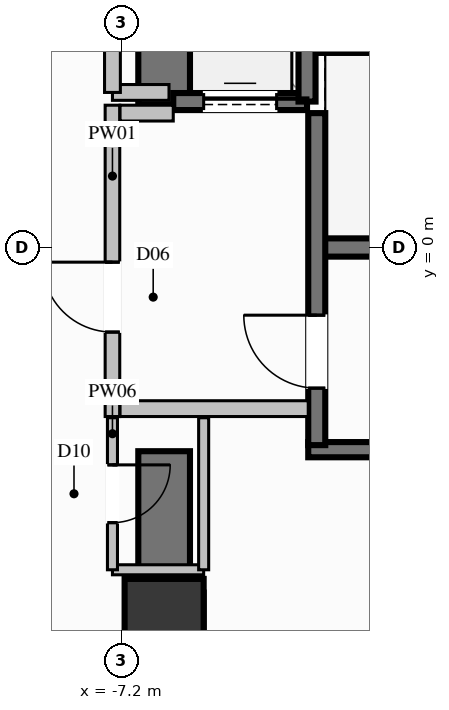
"""IFC4 building model, lengths in metres.
Left out: names, types, materials, properties, quantities, classifications, styles, units other than length and angle.
Written with IfcOpenShell. Run it as: python <this file> out.ifc"""

import sys

from ifc_helpers import new_model, si_unit, direction, frame, frame_2d, origin, origin_2d, place, context, subcontext, project, spatial, rectangle, extrude, element, fill, save


model = new_model("IFC4")
c1 = context("Model", 3, precision=1e-05, world=origin(), true_north=direction((0.0, 1.0)))
c2 = subcontext(c1, "Body", "Model", "MODEL_VIEW")
j1 = project(units=[si_unit("LENGTHUNIT", "METRE"), si_unit("PLANEANGLEUNIT", "RADIAN")], contexts=[c1])
p1 = place(None, origin())
s1 = spatial("IfcSite", under=j1, at=p1, CompositionType="ELEMENT")
p2 = place(p1, origin())
s2 = spatial("IfcBuilding", under=s1, at=p2, CompositionType="ELEMENT")
p3 = place(p2, frame((0.0, 0.0, -4.8)))
s3 = spatial("IfcBuildingStorey", under=s2, at=p3, CompositionType="ELEMENT", Elevation=-4.8)
p4 = place(p3, frame((-6.5, -6.1, 0.0), z_axis=(0.0, 0.0, 1.0), x_axis=(1.0, 0.0, 0.0)))
e1 = element("IfcColumn", 1, at=p4, inside=s3, PredefinedType="COLUMN", context=c2, shape_type="SweptSolid", body=[
    extrude(rectangle(XDim=1.3, YDim=1.3, at=origin_2d()), origin(), (0.0, 0.0, 1.0), 4.8),
])
p5 = place(p3, frame((-3.99, 0.0, 0.0), z_axis=(0.0, 0.0, 1.0), x_axis=(1.0, 0.0, 0.0)))
e2 = element("IfcWall", 2, at=p5, inside=s3, PredefinedType="SHEAR", context=c2, shape_type="SweptSolid", body=[
    extrude(rectangle(XDim=7.98, YDim=0.3, at=frame_2d((3.99, 0.0))), origin(), (0.0, 0.0, 1.0), 4.8),
])
for number, where, z_axis, x_axis in (
    (3, (-4.13, -3.325, 0.0), (0.0, 0.0, 1.0), (1.0, 0.0, 0.0)),
    (4, (-4.13, 3.325, 0.0), (0.0, 0.0, 1.0), (1.0, 0.0, 0.0)),
):
    element("IfcWall", number, at=place(p3, frame(where, z_axis=z_axis, x_axis=x_axis)), inside=s3, PredefinedType="SOLIDWALL", context=c2, shape_type="SweptSolid", body=[
        extrude(rectangle(XDim=8.26, YDim=0.25, at=frame_2d((4.13, 0.0))), origin(), (0.0, 0.0, 1.0), 4.8),
    ])
p6 = place(p3, frame((-6.075, -6.1, 0.0), z_axis=(0.0, 0.0, 1.0), x_axis=(1.0, 0.0, 0.0)))
e5 = element("IfcWall", 5, at=p6, inside=s3, PredefinedType="SHEAR", context=c2, shape_type="SweptSolid", body=[
    extrude(rectangle(XDim=0.225, YDim=0.85, at=frame_2d((0.112, 0.0))), origin(), (0.0, 0.0, 1.0), 4.8),
])
p7 = place(p3, frame((-6.5, 2.35, 0.0), z_axis=(0.0, 0.0, 1.0), x_axis=(0.0, 1.0, 0.0)))
e6 = element("IfcWall", 6, at=p7, inside=s3, PredefinedType="SHEAR", context=c2, shape_type="SweptSolid", body=[
    extrude(rectangle(XDim=4.175, YDim=0.85, at=frame_2d((2.087, 0.0))), origin(), (0.0, 0.0, 1.0), 4.8),
])
p8 = place(p3, frame((-6.5, -6.525, 0.0), z_axis=(0.0, 0.0, 1.0), x_axis=(0.0, 1.0, 0.0)))
e7 = element("IfcWall", 7, at=p8, inside=s3, PredefinedType="SHEAR", context=c2, shape_type="SweptSolid", body=[
    extrude(rectangle(XDim=3.175, YDim=0.85, at=frame_2d((1.587, 0.0))), origin(), (0.0, 0.0, 1.0), 4.8),
])
p9 = place(p3, frame((-6.35, 2.4, 0.0), z_axis=(0.0, 0.0, 1.0), x_axis=(1.0, 0.0, 0.0)))
e8 = element("IfcWall", 8, at=p9, inside=s3, PredefinedType="SOLIDWALL", context=c2, shape_type="SweptSolid", body=[
    extrude(rectangle(XDim=2.2, YDim=0.28, at=frame_2d((1.1, 0.0))), origin(), (0.0, 0.0, 1.0), 4.395),
])
p10 = place(p9, frame((0.5, 0.0, 0.0)))
e9 = element("IfcOpeningElement", 9, at=p10, cuts=e8, PredefinedType="OPENING", context=c2, shape_type="SweptSolid", body=[
    extrude(rectangle(XDim=1.2, YDim=2.2, at=frame_2d((0.6, 1.1))), frame((0.0, 0.15, 0.0), z_axis=(0.0, -1.0, 0.0), x_axis=(1.0, 0.0, 0.0)), (0.0, 0.0, 1.0), 0.3),
])
p11 = place(p3, frame((-4.15, 2.4, 0.0), z_axis=(0.0, 0.0, 1.0), x_axis=(0.0, 1.0, 0.0)))
e10 = element("IfcWall", 10, at=p11, inside=s3, PredefinedType="SOLIDWALL", context=c2, shape_type="SweptSolid", body=[
    extrude(rectangle(XDim=2.7, YDim=0.28, at=frame_2d((1.35, 0.0))), origin(), (0.0, 0.0, 1.0), 4.395),
])
p12 = place(p3, frame((-3.99, -3.25, 0.0), z_axis=(0.0, 0.0, 1.0), x_axis=(0.0, 1.0, 0.0)))
e11 = element("IfcWall", 11, at=p12, inside=s3, PredefinedType="SOLIDWALL", context=c2, shape_type="SweptSolid", body=[
    extrude(rectangle(XDim=5.46, YDim=0.28, at=frame_2d((2.73, 0.0))), origin(), (0.0, 0.0, 1.0), 4.395),
])
p13 = place(p12, frame((0.937, 0.0, 0.0)))
e12 = element("IfcOpeningElement", 12, at=p13, cuts=e11, PredefinedType="OPENING", context=c2, shape_type="SweptSolid", body=[
    extrude(rectangle(XDim=1.2, YDim=2.2, at=frame_2d((0.6, 1.1))), frame((0.0, 0.15, 0.0), z_axis=(0.0, -1.0, 0.0), x_axis=(1.0, 0.0, 0.0)), (0.0, 0.0, 1.0), 0.3),
])
p14 = place(p3, frame((-7.35, -2.78, 0.0), z_axis=(0.0, 0.0, 1.0), x_axis=(0.0, 1.0, 0.0)))
e13 = element("IfcWall", 13, at=p14, inside=s3, PredefinedType="PARTITIONING", context=c2, shape_type="SweptSolid", body=[
    extrude(rectangle(XDim=5.12, YDim=0.24, at=frame_2d((2.56, 0.0))), origin(), (0.0, 0.0, 1.0), 3.28),
])
p15 = place(p14, frame((1.389, 0.0, 0.0)))
e14 = element("IfcOpeningElement", 14, at=p15, cuts=e13, PredefinedType="OPENING", context=c2, shape_type="SweptSolid", body=[
    extrude(rectangle(XDim=1.15, YDim=2.2, at=frame_2d((0.575, 1.1))), frame((0.0, 0.13, 0.0), z_axis=(0.0, -1.0, 0.0), x_axis=(1.0, 0.0, 0.0)), (0.0, 0.0, 1.0), 0.26),
])
p16 = place(p3, frame((-7.225, -2.65, 0.0), z_axis=(0.0, 0.0, 1.0), x_axis=(1.0, 0.0, 0.0)))
e15 = element("IfcWall", 15, at=p16, inside=s3, PredefinedType="PARTITIONING", context=c2, shape_type="SweptSolid", body=[
    extrude(rectangle(XDim=3.095, YDim=0.26, at=frame_2d((1.548, 0.0))), origin(), (0.0, 0.0, 1.0), 4.395),
])
p17 = place(p3, frame((-7.225, 2.21, 0.0), z_axis=(0.0, 0.0, 1.0), x_axis=(1.0, 0.0, 0.0)))
e16 = element("IfcWall", 16, at=p17, inside=s3, PredefinedType="PARTITIONING", context=c2, shape_type="SweptSolid", body=[
    extrude(rectangle(XDim=0.875, YDim=0.26, at=frame_2d((0.438, 0.0))), origin(), (0.0, 0.0, 1.0), 4.395),
])
p18 = place(p3, frame((-7.35, 2.55, 0.0), z_axis=(0.0, 0.0, 1.0), x_axis=(1.0, 0.0, 0.0)))
e17 = element("IfcWall", 17, at=p18, inside=s3, PredefinedType="PARTITIONING", context=c2, shape_type="SweptSolid", body=[
    extrude(rectangle(XDim=0.93, YDim=0.26, at=frame_2d((0.465, 0.0))), origin(), (0.0, 0.0, 1.0), 4.395),
])
p19 = place(p3, frame((-7.35, 2.55, 0.0), z_axis=(0.0, 0.0, 1.0), x_axis=(0.0, 1.0, 0.0)))
e18 = element("IfcWall", 18, at=p19, inside=s3, PredefinedType="PARTITIONING", context=c2, shape_type="SweptSolid", body=[
    extrude(rectangle(XDim=2.4, YDim=0.26, at=frame_2d((1.2, 0.0))), origin(), (0.0, 0.0, 1.0), 3.28),
])
p20 = place(p19, frame((0.775, 0.0, 0.0)))
e19 = element("IfcOpeningElement", 19, at=p20, cuts=e18, PredefinedType="OPENING", context=c2, shape_type="SweptSolid", body=[
    extrude(rectangle(XDim=0.85, YDim=2.05, at=frame_2d((0.425, 1.025))), frame((0.0, 0.14, 0.0), z_axis=(0.0, -1.0, 0.0), x_axis=(1.0, 0.0, 0.0)), (0.0, 0.0, 1.0), 0.28),
])
p21 = place(p3, frame((-7.35, -5.3, 0.0), z_axis=(0.0, 0.0, 1.0), x_axis=(1.0, 0.0, 0.0)))
e20 = element("IfcWall", 20, at=p21, inside=s3, PredefinedType="PARTITIONING", context=c2, shape_type="SweptSolid", body=[
    extrude(rectangle(XDim=1.5, YDim=0.165, at=frame_2d((0.75, 0.0))), origin(), (0.0, 0.0, 1.0), 3.28),
])
p22 = place(p3, frame((-5.85, -5.3, 0.0), z_axis=(0.0, 0.0, 1.0), x_axis=(0.0, 1.0, 0.0)))
e21 = element("IfcWall", 21, at=p22, inside=s3, PredefinedType="PARTITIONING", context=c2, shape_type="SweptSolid", body=[
    extrude(rectangle(XDim=2.5, YDim=0.165, at=frame_2d((1.25, 0.0))), origin(), (0.0, 0.0, 1.0), 3.28),
])
p23 = place(p3, frame((-7.35, -2.8, 0.0), z_axis=(0.0, 0.0, 1.0), x_axis=(0.0, -1.0, 0.0)))
e22 = element("IfcWall", 22, at=p23, inside=s3, PredefinedType="PARTITIONING", context=c2, shape_type="SweptSolid", body=[
    extrude(rectangle(XDim=2.5, YDim=0.165, at=frame_2d((1.25, 0.0))), origin(), (0.0, 0.0, 1.0), 3.28),
])
p24 = place(p23, frame((0.775, 0.0, 0.0)))
e23 = element("IfcOpeningElement", 23, at=p24, cuts=e22, PredefinedType="OPENING", context=c2, shape_type="SweptSolid", body=[
    extrude(rectangle(XDim=0.95, YDim=2.1, at=frame_2d((0.475, 1.05))), frame((0.0, 0.093, 0.0), z_axis=(0.0, -1.0, 0.0), x_axis=(1.0, 0.0, 0.0)), (0.0, 0.0, 1.0), 0.185),
])
p25 = place(p10, origin())
e24 = element("IfcDoor", 24, at=p25, inside=s3, OperationType="SLIDING_TO_LEFT", PredefinedType="DOOR", context=c2, shape_type="SweptSolid", body=[
    extrude(rectangle(XDim=1.2, YDim=2.2, at=frame_2d((0.6, 1.1))), frame((0.0, 0.025, 0.0), z_axis=(0.0, -1.0, 0.0), x_axis=(1.0, 0.0, 0.0)), (0.0, 0.0, 1.0), 0.05),
])
fill(e9, e24)
p26 = place(p13, origin())
e25 = element("IfcDoor", 25, at=p26, inside=s3, OperationType="SINGLE_SWING_RIGHT", PredefinedType="DOOR", context=c2, shape_type="SweptSolid", body=[
    extrude(rectangle(XDim=1.2, YDim=2.2, at=frame_2d((0.6, 1.1))), frame((0.0, 0.025, 0.0), z_axis=(0.0, -1.0, 0.0), x_axis=(1.0, 0.0, 0.0)), (0.0, 0.0, 1.0), 0.05),
])
fill(e12, e25)
p27 = place(p15, origin())
e26 = element("IfcDoor", 26, at=p27, inside=s3, OperationType="SINGLE_SWING_RIGHT", PredefinedType="DOOR", context=c2, shape_type="SweptSolid", body=[
    extrude(rectangle(XDim=1.15, YDim=2.2, at=frame_2d((0.575, 1.1))), frame((0.0, 0.025, 0.0), z_axis=(0.0, -1.0, 0.0), x_axis=(1.0, 0.0, 0.0)), (0.0, 0.0, 1.0), 0.05),
])
fill(e14, e26)
p28 = place(p24, origin())
e27 = element("IfcDoor", 27, at=p28, inside=s3, OperationType="SINGLE_SWING_LEFT", PredefinedType="DOOR", context=c2, shape_type="SweptSolid", body=[
    extrude(rectangle(XDim=0.95, YDim=2.1, at=frame_2d((0.475, 1.05))), frame((0.0, 0.025, 0.0), z_axis=(0.0, -1.0, 0.0), x_axis=(1.0, 0.0, 0.0)), (0.0, 0.0, 1.0), 0.05),
])
fill(e23, e27)
save(model, sys.argv[1])
